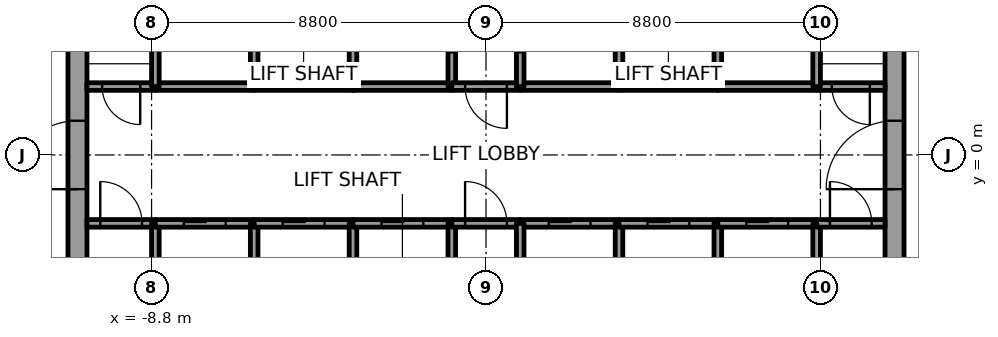
"""IFC4 building model, lengths in metres.
Left out: names, types, materials, properties, quantities, classifications, styles, units other than length and angle.
Written with IfcOpenShell. Run it as: python <this file> out.ifc"""

import sys

from ifc_helpers import new_model, si_unit, direction, frame, frame_2d, origin, place, context, subcontext, project, spatial, rectangle, extrude, element, fill, save


model = new_model("IFC4")
c1 = context("Model", 3, precision=1e-05, world=origin(), true_north=direction((0.0, 1.0)))
c2 = subcontext(c1, "Body", "Model", "MODEL_VIEW")
j1 = project(units=[si_unit("LENGTHUNIT", "METRE"), si_unit("PLANEANGLEUNIT", "RADIAN")], contexts=[c1])
p1 = place(None, origin())
s1 = spatial("IfcSite", under=j1, at=p1, CompositionType="ELEMENT")
p2 = place(p1, origin())
s2 = spatial("IfcBuilding", under=s1, at=p2, CompositionType="ELEMENT")
p3 = place(p2, frame((0.0, 0.0, 51.7)))
s3 = spatial("IfcBuildingStorey", under=s2, at=p3, CompositionType="ELEMENT", Elevation=51.7)
p4 = place(p3, frame((-10.75, -7.5, 0.0), z_axis=(0.0, 0.0, 1.0), x_axis=(0.0, 1.0, 0.0)))
e1 = element("IfcWall", 1, at=p4, inside=s3, PredefinedType="SHEAR", context=c2, shape_type="SweptSolid", body=[
    extrude(rectangle(XDim=15.0, YDim=0.5, at=frame_2d((7.5, 0.0))), origin(), (0.0, 0.0, 1.0), 3.7),
])
p5 = place(p4, frame((6.6, 0.0, 0.0)))
e2 = element("IfcOpeningElement", 2, at=p5, cuts=e1, PredefinedType="OPENING", context=c2, shape_type="SweptSolid", body=[
    extrude(rectangle(XDim=1.8, YDim=2.1, at=frame_2d((0.9, 1.05))), frame((0.0, 0.25, 0.0), z_axis=(0.0, -1.0, 0.0), x_axis=(1.0, 0.0, 0.0)), (0.0, 0.0, 1.0), 0.5),
])
p6 = place(p3, frame((10.75, -7.5, 0.0), z_axis=(0.0, 0.0, 1.0), x_axis=(0.0, 1.0, 0.0)))
e3 = element("IfcWall", 3, at=p6, inside=s3, PredefinedType="SHEAR", context=c2, shape_type="SweptSolid", body=[
    extrude(rectangle(XDim=15.0, YDim=0.5, at=frame_2d((7.5, 0.0))), origin(), (0.0, 0.0, 1.0), 3.7),
])
p7 = place(p6, frame((6.6, 0.0, 0.0)))
e4 = element("IfcOpeningElement", 4, at=p7, cuts=e3, PredefinedType="OPENING", context=c2, shape_type="SweptSolid", body=[
    extrude(rectangle(XDim=1.8, YDim=2.1, at=frame_2d((0.9, 1.05))), frame((0.0, 0.25, 0.0), z_axis=(0.0, -1.0, 0.0), x_axis=(1.0, 0.0, 0.0)), (0.0, 0.0, 1.0), 0.5),
])
p8 = place(p3, frame((-10.5, -1.8, 0.0), z_axis=(0.0, 0.0, 1.0), x_axis=(1.0, 0.0, 0.0)))
e5 = element("IfcWall", 5, at=p8, inside=s3, PredefinedType="SOLIDWALL", context=c2, shape_type="SweptSolid", body=[
    extrude(rectangle(XDim=1.8, YDim=0.2, at=frame_2d((0.9, 0.0))), origin(), (0.0, 0.0, 1.0), 3.55),
])
p9 = place(p8, frame((0.35, 0.0, 0.0)))
e6 = element("IfcOpeningElement", 6, at=p9, cuts=e5, PredefinedType="OPENING", context=c2, shape_type="SweptSolid", body=[
    extrude(rectangle(XDim=1.1, YDim=2.1, at=frame_2d((0.55, 1.05))), frame((0.0, 0.1, 0.0), z_axis=(0.0, -1.0, 0.0), x_axis=(1.0, 0.0, 0.0)), (0.0, 0.0, 1.0), 0.2),
])
p10 = place(p3, frame((-8.7, 1.8, 0.0), z_axis=(0.0, 0.0, 1.0), x_axis=(-1.0, 0.0, 0.0)))
e7 = element("IfcWall", 7, at=p10, inside=s3, PredefinedType="SOLIDWALL", context=c2, shape_type="SweptSolid", body=[
    extrude(rectangle(XDim=1.8, YDim=0.2, at=frame_2d((0.9, 0.0))), origin(), (0.0, 0.0, 1.0), 3.55),
])
p11 = place(p10, frame((0.4, 0.0, 0.0)))
e8 = element("IfcOpeningElement", 8, at=p11, cuts=e7, PredefinedType="OPENING", context=c2, shape_type="SweptSolid", body=[
    extrude(rectangle(XDim=1.0, YDim=2.1, at=frame_2d((0.5, 1.05))), frame((0.0, 0.1, 0.0), z_axis=(0.0, -1.0, 0.0), x_axis=(1.0, 0.0, 0.0)), (0.0, 0.0, 1.0), 0.2),
])
p12 = place(p3, frame((-8.7, -4.6, 0.0), z_axis=(0.0, 0.0, 1.0), x_axis=(0.0, 1.0, 0.0)))
e9 = element("IfcWall", 9, at=p12, inside=s3, PredefinedType="SOLIDWALL", context=c2, shape_type="SweptSolid", body=[
    extrude(rectangle(XDim=2.8, YDim=0.2, at=frame_2d((1.4, 0.0))), origin(), (0.0, 0.0, 1.0), 3.55),
])
p13 = place(p3, frame((-8.7, -1.8, 0.0), z_axis=(0.0, 0.0, 1.0), x_axis=(1.0, 0.0, 0.0)))
e10 = element("IfcWall", 10, at=p13, inside=s3, PredefinedType="SOLIDWALL", context=c2, shape_type="SweptSolid", body=[
    extrude(rectangle(XDim=2.6, YDim=0.2, at=frame_2d((1.3, 0.0))), origin(), (0.0, 0.0, 1.0), 3.55),
])
p14 = place(p13, frame((0.75, 0.0, 0.0)))
e11 = element("IfcOpeningElement", 11, at=p14, cuts=e10, PredefinedType="OPENING", context=c2, shape_type="SweptSolid", body=[
    extrude(rectangle(XDim=1.1, YDim=2.1, at=frame_2d((0.55, 1.05))), frame((0.0, 0.1, 0.0), z_axis=(0.0, -1.0, 0.0), x_axis=(1.0, 0.0, 0.0)), (0.0, 0.0, 1.0), 0.2),
])
p15 = place(p3, frame((-6.1, 1.8, 0.0), z_axis=(0.0, 0.0, 1.0), x_axis=(-1.0, 0.0, 0.0)))
e12 = element("IfcWall", 12, at=p15, inside=s3, PredefinedType="SOLIDWALL", context=c2, shape_type="SweptSolid", body=[
    extrude(rectangle(XDim=2.6, YDim=0.2, at=frame_2d((1.3, 0.0))), origin(), (0.0, 0.0, 1.0), 3.55),
])
for number, where, z_axis, x_axis in (
    (13, (-8.7, 1.8, 0.0), (0.0, 0.0, 1.0), (0.0, 1.0, 0.0)),
    (14, (-6.1, -4.6, 0.0), (0.0, 0.0, 1.0), (0.0, 1.0, 0.0)),
):
    element("IfcWall", number, at=place(p3, frame(where, z_axis=z_axis, x_axis=x_axis)), inside=s3, PredefinedType="SOLIDWALL", context=c2, shape_type="SweptSolid", body=[
        extrude(rectangle(XDim=2.8, YDim=0.2, at=frame_2d((1.4, 0.0))), origin(), (0.0, 0.0, 1.0), 3.55),
    ])
p16 = place(p3, frame((-6.1, -1.8, 0.0), z_axis=(0.0, 0.0, 1.0), x_axis=(1.0, 0.0, 0.0)))
e15 = element("IfcWall", 15, at=p16, inside=s3, PredefinedType="SOLIDWALL", context=c2, shape_type="SweptSolid", body=[
    extrude(rectangle(XDim=2.6, YDim=0.2, at=frame_2d((1.3, 0.0))), origin(), (0.0, 0.0, 1.0), 3.55),
])
p17 = place(p16, frame((0.75, 0.0, 0.0)))
e16 = element("IfcOpeningElement", 16, at=p17, cuts=e15, PredefinedType="OPENING", context=c2, shape_type="SweptSolid", body=[
    extrude(rectangle(XDim=1.1, YDim=2.1, at=frame_2d((0.55, 1.05))), frame((0.0, 0.1, 0.0), z_axis=(0.0, -1.0, 0.0), x_axis=(1.0, 0.0, 0.0)), (0.0, 0.0, 1.0), 0.2),
])
p18 = place(p3, frame((-3.5, 1.8, 0.0), z_axis=(0.0, 0.0, 1.0), x_axis=(-1.0, 0.0, 0.0)))
e17 = element("IfcWall", 17, at=p18, inside=s3, PredefinedType="SOLIDWALL", context=c2, shape_type="SweptSolid", body=[
    extrude(rectangle(XDim=2.6, YDim=0.2, at=frame_2d((1.3, 0.0))), origin(), (0.0, 0.0, 1.0), 3.55),
])
for number, where, z_axis, x_axis in (
    (18, (-6.1, 1.8, 0.0), (0.0, 0.0, 1.0), (0.0, 1.0, 0.0)),
    (19, (-3.5, -4.6, 0.0), (0.0, 0.0, 1.0), (0.0, 1.0, 0.0)),
):
    element("IfcWall", number, at=place(p3, frame(where, z_axis=z_axis, x_axis=x_axis)), inside=s3, PredefinedType="SOLIDWALL", context=c2, shape_type="SweptSolid", body=[
        extrude(rectangle(XDim=2.8, YDim=0.2, at=frame_2d((1.4, 0.0))), origin(), (0.0, 0.0, 1.0), 3.55),
    ])
p19 = place(p3, frame((-3.5, -1.8, 0.0), z_axis=(0.0, 0.0, 1.0), x_axis=(1.0, 0.0, 0.0)))
e20 = element("IfcWall", 20, at=p19, inside=s3, PredefinedType="SOLIDWALL", context=c2, shape_type="SweptSolid", body=[
    extrude(rectangle(XDim=2.6, YDim=0.2, at=frame_2d((1.3, 0.0))), origin(), (0.0, 0.0, 1.0), 3.55),
])
p20 = place(p19, frame((0.75, 0.0, 0.0)))
e21 = element("IfcOpeningElement", 21, at=p20, cuts=e20, PredefinedType="OPENING", context=c2, shape_type="SweptSolid", body=[
    extrude(rectangle(XDim=1.1, YDim=2.1, at=frame_2d((0.55, 1.05))), frame((0.0, 0.1, 0.0), z_axis=(0.0, -1.0, 0.0), x_axis=(1.0, 0.0, 0.0)), (0.0, 0.0, 1.0), 0.2),
])
p21 = place(p3, frame((-0.9, 1.8, 0.0), z_axis=(0.0, 0.0, 1.0), x_axis=(-1.0, 0.0, 0.0)))
e22 = element("IfcWall", 22, at=p21, inside=s3, PredefinedType="SOLIDWALL", context=c2, shape_type="SweptSolid", body=[
    extrude(rectangle(XDim=2.6, YDim=0.2, at=frame_2d((1.3, 0.0))), origin(), (0.0, 0.0, 1.0), 3.55),
])
p22 = place(p3, frame((-3.5, 4.6, 0.0), z_axis=(0.0, 0.0, 1.0), x_axis=(0.0, -1.0, 0.0)))
e23 = element("IfcWall", 23, at=p22, inside=s3, PredefinedType="SOLIDWALL", context=c2, shape_type="SweptSolid", body=[
    extrude(rectangle(XDim=2.8, YDim=0.2, at=frame_2d((1.4, 0.0))), origin(), (0.0, 0.0, 1.0), 3.55),
])
p23 = place(p3, frame((-0.9, 1.8, 0.0), z_axis=(0.0, 0.0, 1.0), x_axis=(0.0, 1.0, 0.0)))
e24 = element("IfcWall", 24, at=p23, inside=s3, PredefinedType="SOLIDWALL", context=c2, shape_type="SweptSolid", body=[
    extrude(rectangle(XDim=3.0, YDim=0.2, at=frame_2d((1.5, 0.0))), origin(), (0.0, 0.0, 1.0), 3.55),
])
p24 = place(p23, frame((0.9, 0.0, 0.0)))
e25 = element("IfcOpeningElement", 25, at=p24, cuts=e24, PredefinedType="OPENING", context=c2, shape_type="SweptSolid", body=[
    extrude(rectangle(XDim=1.2, YDim=2.1, at=frame_2d((0.6, 1.05))), frame((0.0, 0.1, 0.0), z_axis=(0.0, -1.0, 0.0), x_axis=(1.0, 0.0, 0.0)), (0.0, 0.0, 1.0), 0.2),
])
p25 = place(p3, frame((-0.9, -4.6, 0.0), z_axis=(0.0, 0.0, 1.0), x_axis=(0.0, 1.0, 0.0)))
e26 = element("IfcWall", 26, at=p25, inside=s3, PredefinedType="SOLIDWALL", context=c2, shape_type="SweptSolid", body=[
    extrude(rectangle(XDim=2.8, YDim=0.2, at=frame_2d((1.4, 0.0))), origin(), (0.0, 0.0, 1.0), 3.55),
])
p26 = place(p3, frame((-0.9, -1.8, 0.0), z_axis=(0.0, 0.0, 1.0), x_axis=(1.0, 0.0, 0.0)))
e27 = element("IfcWall", 27, at=p26, inside=s3, PredefinedType="SOLIDWALL", context=c2, shape_type="SweptSolid", body=[
    extrude(rectangle(XDim=1.8, YDim=0.2, at=frame_2d((0.9, 0.0))), origin(), (0.0, 0.0, 1.0), 3.55),
])
p27 = place(p26, frame((0.35, 0.0, 0.0)))
e28 = element("IfcOpeningElement", 28, at=p27, cuts=e27, PredefinedType="OPENING", context=c2, shape_type="SweptSolid", body=[
    extrude(rectangle(XDim=1.1, YDim=2.1, at=frame_2d((0.55, 1.05))), frame((0.0, 0.1, 0.0), z_axis=(0.0, -1.0, 0.0), x_axis=(1.0, 0.0, 0.0)), (0.0, 0.0, 1.0), 0.2),
])
p28 = place(p3, frame((0.9, 1.8, 0.0), z_axis=(0.0, 0.0, 1.0), x_axis=(-1.0, 0.0, 0.0)))
e29 = element("IfcWall", 29, at=p28, inside=s3, PredefinedType="SOLIDWALL", context=c2, shape_type="SweptSolid", body=[
    extrude(rectangle(XDim=1.8, YDim=0.2, at=frame_2d((0.9, 0.0))), origin(), (0.0, 0.0, 1.0), 3.55),
])
p29 = place(p28, frame((0.35, 0.0, 0.0)))
e30 = element("IfcOpeningElement", 30, at=p29, cuts=e29, PredefinedType="OPENING", context=c2, shape_type="SweptSolid", body=[
    extrude(rectangle(XDim=1.1, YDim=2.1, at=frame_2d((0.55, 1.05))), frame((0.0, 0.1, 0.0), z_axis=(0.0, -1.0, 0.0), x_axis=(1.0, 0.0, 0.0)), (0.0, 0.0, 1.0), 0.2),
])
p30 = place(p3, frame((0.9, -1.8, 0.0), z_axis=(0.0, 0.0, 1.0), x_axis=(1.0, 0.0, 0.0)))
e31 = element("IfcWall", 31, at=p30, inside=s3, PredefinedType="SOLIDWALL", context=c2, shape_type="SweptSolid", body=[
    extrude(rectangle(XDim=2.6, YDim=0.2, at=frame_2d((1.3, 0.0))), origin(), (0.0, 0.0, 1.0), 3.55),
])
p31 = place(p30, frame((0.75, 0.0, 0.0)))
e32 = element("IfcOpeningElement", 32, at=p31, cuts=e31, PredefinedType="OPENING", context=c2, shape_type="SweptSolid", body=[
    extrude(rectangle(XDim=1.1, YDim=2.1, at=frame_2d((0.55, 1.05))), frame((0.0, 0.1, 0.0), z_axis=(0.0, -1.0, 0.0), x_axis=(1.0, 0.0, 0.0)), (0.0, 0.0, 1.0), 0.2),
])
p32 = place(p3, frame((0.9, -1.8, 0.0), z_axis=(0.0, 0.0, 1.0), x_axis=(0.0, -1.0, 0.0)))
e33 = element("IfcWall", 33, at=p32, inside=s3, PredefinedType="SOLIDWALL", context=c2, shape_type="SweptSolid", body=[
    extrude(rectangle(XDim=2.8, YDim=0.2, at=frame_2d((1.4, 0.0))), origin(), (0.0, 0.0, 1.0), 3.55),
])
p33 = place(p3, frame((3.5, 1.8, 0.0), z_axis=(0.0, 0.0, 1.0), x_axis=(-1.0, 0.0, 0.0)))
e34 = element("IfcWall", 34, at=p33, inside=s3, PredefinedType="SOLIDWALL", context=c2, shape_type="SweptSolid", body=[
    extrude(rectangle(XDim=2.6, YDim=0.2, at=frame_2d((1.3, 0.0))), origin(), (0.0, 0.0, 1.0), 3.55),
])
p34 = place(p3, frame((0.9, 4.8, 0.0), z_axis=(0.0, 0.0, 1.0), x_axis=(0.0, -1.0, 0.0)))
e35 = element("IfcWall", 35, at=p34, inside=s3, PredefinedType="SOLIDWALL", context=c2, shape_type="SweptSolid", body=[
    extrude(rectangle(XDim=3.0, YDim=0.2, at=frame_2d((1.5, 0.0))), origin(), (0.0, 0.0, 1.0), 3.55),
])
p35 = place(p34, frame((0.9, 0.0, 0.0)))
e36 = element("IfcOpeningElement", 36, at=p35, cuts=e35, PredefinedType="OPENING", context=c2, shape_type="SweptSolid", body=[
    extrude(rectangle(XDim=1.2, YDim=2.1, at=frame_2d((0.6, 1.05))), frame((0.0, 0.1, 0.0), z_axis=(0.0, -1.0, 0.0), x_axis=(1.0, 0.0, 0.0)), (0.0, 0.0, 1.0), 0.2),
])
p36 = place(p3, frame((3.5, -4.6, 0.0), z_axis=(0.0, 0.0, 1.0), x_axis=(0.0, 1.0, 0.0)))
e37 = element("IfcWall", 37, at=p36, inside=s3, PredefinedType="SOLIDWALL", context=c2, shape_type="SweptSolid", body=[
    extrude(rectangle(XDim=2.8, YDim=0.2, at=frame_2d((1.4, 0.0))), origin(), (0.0, 0.0, 1.0), 3.55),
])
p37 = place(p3, frame((3.5, -1.8, 0.0), z_axis=(0.0, 0.0, 1.0), x_axis=(1.0, 0.0, 0.0)))
e38 = element("IfcWall", 38, at=p37, inside=s3, PredefinedType="SOLIDWALL", context=c2, shape_type="SweptSolid", body=[
    extrude(rectangle(XDim=2.6, YDim=0.2, at=frame_2d((1.3, 0.0))), origin(), (0.0, 0.0, 1.0), 3.55),
])
p38 = place(p37, frame((0.75, 0.0, 0.0)))
e39 = element("IfcOpeningElement", 39, at=p38, cuts=e38, PredefinedType="OPENING", context=c2, shape_type="SweptSolid", body=[
    extrude(rectangle(XDim=1.1, YDim=2.1, at=frame_2d((0.55, 1.05))), frame((0.0, 0.1, 0.0), z_axis=(0.0, -1.0, 0.0), x_axis=(1.0, 0.0, 0.0)), (0.0, 0.0, 1.0), 0.2),
])
p39 = place(p3, frame((6.1, 1.8, 0.0), z_axis=(0.0, 0.0, 1.0), x_axis=(-1.0, 0.0, 0.0)))
e40 = element("IfcWall", 40, at=p39, inside=s3, PredefinedType="SOLIDWALL", context=c2, shape_type="SweptSolid", body=[
    extrude(rectangle(XDim=2.6, YDim=0.2, at=frame_2d((1.3, 0.0))), origin(), (0.0, 0.0, 1.0), 3.55),
])
for number, where, z_axis, x_axis in (
    (41, (3.5, 1.8, 0.0), (0.0, 0.0, 1.0), (0.0, 1.0, 0.0)),
    (42, (6.1, -4.6, 0.0), (0.0, 0.0, 1.0), (0.0, 1.0, 0.0)),
):
    element("IfcWall", number, at=place(p3, frame(where, z_axis=z_axis, x_axis=x_axis)), inside=s3, PredefinedType="SOLIDWALL", context=c2, shape_type="SweptSolid", body=[
        extrude(rectangle(XDim=2.8, YDim=0.2, at=frame_2d((1.4, 0.0))), origin(), (0.0, 0.0, 1.0), 3.55),
    ])
p40 = place(p3, frame((6.1, -1.8, 0.0), z_axis=(0.0, 0.0, 1.0), x_axis=(1.0, 0.0, 0.0)))
e43 = element("IfcWall", 43, at=p40, inside=s3, PredefinedType="SOLIDWALL", context=c2, shape_type="SweptSolid", body=[
    extrude(rectangle(XDim=2.6, YDim=0.2, at=frame_2d((1.3, 0.0))), origin(), (0.0, 0.0, 1.0), 3.55),
])
p41 = place(p40, frame((0.75, 0.0, 0.0)))
e44 = element("IfcOpeningElement", 44, at=p41, cuts=e43, PredefinedType="OPENING", context=c2, shape_type="SweptSolid", body=[
    extrude(rectangle(XDim=1.1, YDim=2.1, at=frame_2d((0.55, 1.05))), frame((0.0, 0.1, 0.0), z_axis=(0.0, -1.0, 0.0), x_axis=(1.0, 0.0, 0.0)), (0.0, 0.0, 1.0), 0.2),
])
p42 = place(p3, frame((8.7, 1.8, 0.0), z_axis=(0.0, 0.0, 1.0), x_axis=(-1.0, 0.0, 0.0)))
e45 = element("IfcWall", 45, at=p42, inside=s3, PredefinedType="SOLIDWALL", context=c2, shape_type="SweptSolid", body=[
    extrude(rectangle(XDim=2.6, YDim=0.2, at=frame_2d((1.3, 0.0))), origin(), (0.0, 0.0, 1.0), 3.55),
])
for number, where, z_axis, x_axis in (
    (46, (6.1, 1.8, 0.0), (0.0, 0.0, 1.0), (0.0, 1.0, 0.0)),
    (47, (8.7, -1.8, 0.0), (0.0, 0.0, 1.0), (0.0, -1.0, 0.0)),
):
    element("IfcWall", number, at=place(p3, frame(where, z_axis=z_axis, x_axis=x_axis)), inside=s3, PredefinedType="SOLIDWALL", context=c2, shape_type="SweptSolid", body=[
        extrude(rectangle(XDim=2.8, YDim=0.2, at=frame_2d((1.4, 0.0))), origin(), (0.0, 0.0, 1.0), 3.55),
    ])
p43 = place(p3, frame((8.7, -1.8, 0.0), z_axis=(0.0, 0.0, 1.0), x_axis=(1.0, 0.0, 0.0)))
e48 = element("IfcWall", 48, at=p43, inside=s3, PredefinedType="SOLIDWALL", context=c2, shape_type="SweptSolid", body=[
    extrude(rectangle(XDim=1.8, YDim=0.2, at=frame_2d((0.9, 0.0))), origin(), (0.0, 0.0, 1.0), 3.55),
])
p44 = place(p43, frame((0.35, 0.0, 0.0)))
e49 = element("IfcOpeningElement", 49, at=p44, cuts=e48, PredefinedType="OPENING", context=c2, shape_type="SweptSolid", body=[
    extrude(rectangle(XDim=1.1, YDim=2.1, at=frame_2d((0.55, 1.05))), frame((0.0, 0.1, 0.0), z_axis=(0.0, -1.0, 0.0), x_axis=(1.0, 0.0, 0.0)), (0.0, 0.0, 1.0), 0.2),
])
p45 = place(p3, frame((10.5, 1.8, 0.0), z_axis=(0.0, 0.0, 1.0), x_axis=(-1.0, 0.0, 0.0)))
e50 = element("IfcWall", 50, at=p45, inside=s3, PredefinedType="SOLIDWALL", context=c2, shape_type="SweptSolid", body=[
    extrude(rectangle(XDim=1.8, YDim=0.2, at=frame_2d((0.9, 0.0))), origin(), (0.0, 0.0, 1.0), 3.55),
])
p46 = place(p45, frame((0.4, 0.0, 0.0)))
e51 = element("IfcOpeningElement", 51, at=p46, cuts=e50, PredefinedType="OPENING", context=c2, shape_type="SweptSolid", body=[
    extrude(rectangle(XDim=1.0, YDim=2.1, at=frame_2d((0.5, 1.05))), frame((0.0, 0.1, 0.0), z_axis=(0.0, -1.0, 0.0), x_axis=(1.0, 0.0, 0.0)), (0.0, 0.0, 1.0), 0.2),
])
p47 = place(p3, frame((8.7, 4.6, 0.0), z_axis=(0.0, 0.0, 1.0), x_axis=(0.0, -1.0, 0.0)))
e52 = element("IfcWall", 52, at=p47, inside=s3, PredefinedType="SOLIDWALL", context=c2, shape_type="SweptSolid", body=[
    extrude(rectangle(XDim=2.8, YDim=0.2, at=frame_2d((1.4, 0.0))), origin(), (0.0, 0.0, 1.0), 3.55),
])
p48 = place(p14, origin())
e53 = element("IfcDoor", 53, at=p48, inside=s3, OperationType="SLIDING_TO_RIGHT", PredefinedType="DOOR", context=c2, shape_type="SweptSolid", body=[
    extrude(rectangle(XDim=1.1, YDim=2.1, at=frame_2d((0.55, 1.05))), frame((0.0, 0.025, 0.0), z_axis=(0.0, -1.0, 0.0), x_axis=(1.0, 0.0, 0.0)), (0.0, 0.0, 1.0), 0.05),
])
fill(e11, e53)
p49 = place(p17, origin())
e54 = element("IfcDoor", 54, at=p49, inside=s3, OperationType="SLIDING_TO_LEFT", PredefinedType="DOOR", context=c2, shape_type="SweptSolid", body=[
    extrude(rectangle(XDim=1.1, YDim=2.1, at=frame_2d((0.55, 1.05))), frame((0.0, 0.025, 0.0), z_axis=(0.0, -1.0, 0.0), x_axis=(1.0, 0.0, 0.0)), (0.0, 0.0, 1.0), 0.05),
])
fill(e16, e54)
p50 = place(p20, origin())
e55 = element("IfcDoor", 55, at=p50, inside=s3, OperationType="SLIDING_TO_RIGHT", PredefinedType="DOOR", context=c2, shape_type="SweptSolid", body=[
    extrude(rectangle(XDim=1.1, YDim=2.1, at=frame_2d((0.55, 1.05))), frame((0.0, 0.025, 0.0), z_axis=(0.0, -1.0, 0.0), x_axis=(1.0, 0.0, 0.0)), (0.0, 0.0, 1.0), 0.05),
])
fill(e21, e55)
p51 = place(p31, origin())
e56 = element("IfcDoor", 56, at=p51, inside=s3, OperationType="SLIDING_TO_LEFT", PredefinedType="DOOR", context=c2, shape_type="SweptSolid", body=[
    extrude(rectangle(XDim=1.1, YDim=2.1, at=frame_2d((0.55, 1.05))), frame((0.0, 0.025, 0.0), z_axis=(0.0, -1.0, 0.0), x_axis=(1.0, 0.0, 0.0)), (0.0, 0.0, 1.0), 0.05),
])
fill(e32, e56)
p52 = place(p38, origin())
e57 = element("IfcDoor", 57, at=p52, inside=s3, OperationType="SLIDING_TO_LEFT", PredefinedType="DOOR", context=c2, shape_type="SweptSolid", body=[
    extrude(rectangle(XDim=1.1, YDim=2.1, at=frame_2d((0.55, 1.05))), frame((0.0, 0.025, 0.0), z_axis=(0.0, -1.0, 0.0), x_axis=(1.0, 0.0, 0.0)), (0.0, 0.0, 1.0), 0.05),
])
fill(e39, e57)
p53 = place(p41, origin())
e58 = element("IfcDoor", 58, at=p53, inside=s3, OperationType="SLIDING_TO_LEFT", PredefinedType="DOOR", context=c2, shape_type="SweptSolid", body=[
    extrude(rectangle(XDim=1.1, YDim=2.1, at=frame_2d((0.55, 1.05))), frame((0.0, 0.025, 0.0), z_axis=(0.0, -1.0, 0.0), x_axis=(1.0, 0.0, 0.0)), (0.0, 0.0, 1.0), 0.05),
])
fill(e44, e58)
p54 = place(p9, origin())
e59 = element("IfcDoor", 59, at=p54, inside=s3, OperationType="SINGLE_SWING_RIGHT", PredefinedType="DOOR", context=c2, shape_type="SweptSolid", body=[
    extrude(rectangle(XDim=1.1, YDim=2.1, at=frame_2d((0.55, 1.05))), frame((0.0, 0.025, 0.0), z_axis=(0.0, -1.0, 0.0), x_axis=(1.0, 0.0, 0.0)), (0.0, 0.0, 1.0), 0.05),
])
fill(e6, e59)
p55 = place(p44, origin())
e60 = element("IfcDoor", 60, at=p55, inside=s3, OperationType="SINGLE_SWING_RIGHT", PredefinedType="DOOR", context=c2, shape_type="SweptSolid", body=[
    extrude(rectangle(XDim=1.1, YDim=2.1, at=frame_2d((0.55, 1.05))), frame((0.0, 0.025, 0.0), z_axis=(0.0, -1.0, 0.0), x_axis=(1.0, 0.0, 0.0)), (0.0, 0.0, 1.0), 0.05),
])
fill(e49, e60)
p56 = place(p29, origin())
e61 = element("IfcDoor", 61, at=p56, inside=s3, OperationType="SINGLE_SWING_RIGHT", PredefinedType="DOOR", context=c2, shape_type="SweptSolid", body=[
    extrude(rectangle(XDim=1.1, YDim=2.1, at=frame_2d((0.55, 1.05))), frame((0.0, 0.025, 0.0), z_axis=(0.0, -1.0, 0.0), x_axis=(1.0, 0.0, 0.0)), (0.0, 0.0, 1.0), 0.05),
])
fill(e30, e61)
p57 = place(p27, origin())
e62 = element("IfcDoor", 62, at=p57, inside=s3, OperationType="SINGLE_SWING_LEFT", PredefinedType="DOOR", context=c2, shape_type="SweptSolid", body=[
    extrude(rectangle(XDim=1.1, YDim=2.1, at=frame_2d((0.55, 1.05))), frame((0.0, 0.025, 0.0), z_axis=(0.0, -1.0, 0.0), x_axis=(1.0, 0.0, 0.0)), (0.0, 0.0, 1.0), 0.05),
])
fill(e28, e62)
p58 = place(p11, origin())
e63 = element("IfcDoor", 63, at=p58, inside=s3, OperationType="SINGLE_SWING_LEFT", PredefinedType="DOOR", context=c2, shape_type="SweptSolid", body=[
    extrude(rectangle(XDim=1.0, YDim=2.1, at=frame_2d((0.5, 1.05))), frame((0.0, 0.025, 0.0), z_axis=(0.0, -1.0, 0.0), x_axis=(1.0, 0.0, 0.0)), (0.0, 0.0, 1.0), 0.05),
])
fill(e8, e63)
p59 = place(p46, origin())
e64 = element("IfcDoor", 64, at=p59, inside=s3, OperationType="SINGLE_SWING_RIGHT", PredefinedType="DOOR", context=c2, shape_type="SweptSolid", body=[
    extrude(rectangle(XDim=1.0, YDim=2.1, at=frame_2d((0.5, 1.05))), frame((0.0, 0.025, 0.0), z_axis=(0.0, -1.0, 0.0), x_axis=(1.0, 0.0, 0.0)), (0.0, 0.0, 1.0), 0.05),
])
fill(e51, e64)
p60 = place(p5, origin())
e65 = element("IfcDoor", 65, at=p60, inside=s3, OperationType="DOUBLE_DOOR_SINGLE_SWING", PredefinedType="DOOR", context=c2, shape_type="SweptSolid", body=[
    extrude(rectangle(XDim=1.8, YDim=2.1, at=frame_2d((0.9, 1.05))), frame((0.0, 0.025, 0.0), z_axis=(0.0, -1.0, 0.0), x_axis=(1.0, 0.0, 0.0)), (0.0, 0.0, 1.0), 0.05),
])
fill(e2, e65)
p61 = place(p7, origin())
e66 = element("IfcDoor", 66, at=p61, inside=s3, OperationType="DOUBLE_DOOR_SINGLE_SWING", PredefinedType="DOOR", context=c2, shape_type="SweptSolid", body=[
    extrude(rectangle(XDim=1.8, YDim=2.1, at=frame_2d((0.9, 1.05))), frame((0.0, 0.025, 0.0), z_axis=(0.0, -1.0, 0.0), x_axis=(1.0, 0.0, 0.0)), (0.0, 0.0, 1.0), 0.05),
])
fill(e4, e66)
save(model, sys.argv[1])
